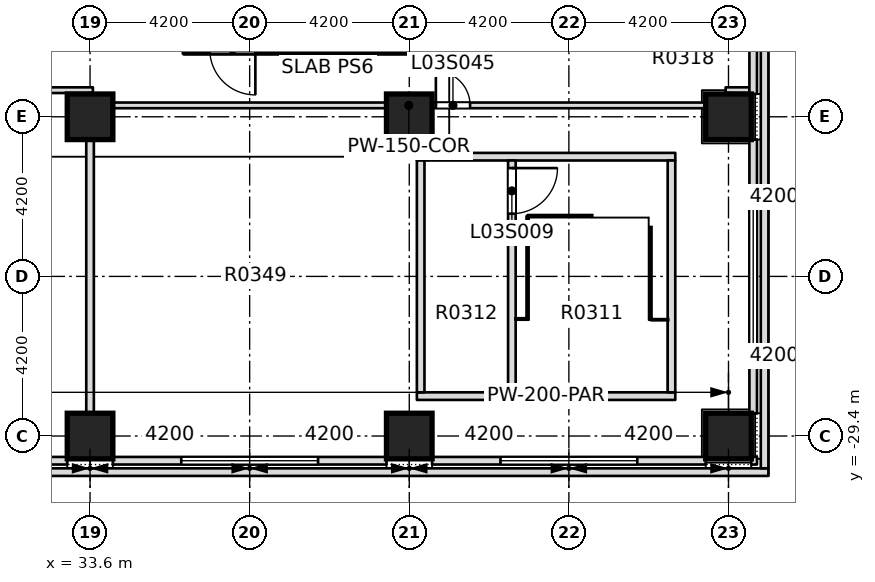
"""IFC4 building model, lengths in metres.
Left out: names, types, materials, properties, quantities, classifications, styles, units other than length and angle.
Written with IfcOpenShell. Run it as: python <this file> out.ifc"""

import sys

from ifc_helpers import new_model, si_unit, direction, frame, frame_2d, origin, origin_2d, place, context, subcontext, project, spatial, rectangle, extrude, element, fill, save


model = new_model("IFC4")
c1 = context("Model", 3, precision=1e-05, world=origin(), true_north=direction((0.0, 1.0)))
c2 = subcontext(c1, "Body", "Model", "MODEL_VIEW")
j1 = project(units=[si_unit("LENGTHUNIT", "METRE"), si_unit("PLANEANGLEUNIT", "RADIAN")], contexts=[c1])
p1 = place(None, origin())
s1 = spatial("IfcSite", under=j1, at=p1, CompositionType="ELEMENT")
p2 = place(p1, origin())
s2 = spatial("IfcBuilding", under=s1, at=p2, CompositionType="ELEMENT")
p3 = place(p2, frame((0.0, 0.0, 20.0)))
s3 = spatial("IfcBuildingStorey", under=s2, at=p3, CompositionType="ELEMENT", Elevation=20.0)
for number, where, z_axis, x_axis in (
    (1, (33.6, -29.4, -0.4), (0.0, 0.0, 1.0), (1.0, 0.0, 0.0)),
    (2, (42.0, -29.4, -0.4), (0.0, 0.0, 1.0), (1.0, 0.0, 0.0)),
):
    element("IfcColumn", number, at=place(p3, frame(where, z_axis=z_axis, x_axis=x_axis)), inside=s3, PredefinedType="COLUMN", context=c2, shape_type="SweptSolid", body=[
        extrude(rectangle(XDim=1.2, YDim=1.2, at=origin_2d()), origin(), (0.0, 0.0, 1.0), 5.0),
    ])
p4 = place(p3, frame((50.4, -29.4, 0.0), z_axis=(0.0, 0.0, 1.0), x_axis=(1.0, 0.0, 0.0)))
e3 = element("IfcColumn", 3, at=p4, inside=s3, PredefinedType="COLUMN", context=c2, shape_type="SweptSolid", body=[
    extrude(rectangle(XDim=1.2, YDim=1.2, at=origin_2d()), origin(), (0.0, 0.0, 1.0), 4.6),
])
for number, where, z_axis, x_axis in (
    (4, (33.6, -21.0, -0.4), (0.0, 0.0, 1.0), (1.0, 0.0, 0.0)),
    (5, (42.0, -21.0, -0.4), (0.0, 0.0, 1.0), (1.0, 0.0, 0.0)),
):
    element("IfcColumn", number, at=place(p3, frame(where, z_axis=z_axis, x_axis=x_axis)), inside=s3, PredefinedType="COLUMN", context=c2, shape_type="SweptSolid", body=[
        extrude(rectangle(XDim=1.2, YDim=1.2, at=origin_2d()), origin(), (0.0, 0.0, 1.0), 5.4),
    ])
p5 = place(p3, frame((50.4, -21.0, 0.0), z_axis=(0.0, 0.0, 1.0), x_axis=(1.0, 0.0, 0.0)))
e6 = element("IfcColumn", 6, at=p5, inside=s3, PredefinedType="COLUMN", context=c2, shape_type="SweptSolid", body=[
    extrude(rectangle(XDim=1.2, YDim=1.2, at=origin_2d()), origin(), (0.0, 0.0, 1.0), 4.6),
])
p6 = place(p3, frame((-26.25, -30.35, 5.0), z_axis=(0.0, 0.0, 1.0), x_axis=(1.0, 0.0, 0.0)))
e7 = element("IfcWall", 7, at=p6, inside=s3, PredefinedType="PARAPET", context=c2, shape_type="SweptSolid", body=[
    extrude(rectangle(XDim=77.7, YDim=0.2, at=frame_2d((38.85, 0.0))), origin(), (0.0, 0.0, 1.0), 1.2),
])
p7 = place(p3, frame((51.35, -30.25, 5.0), z_axis=(0.0, 0.0, 1.0), x_axis=(0.0, 1.0, 0.0)))
e8 = element("IfcWall", 8, at=p7, inside=s3, PredefinedType="PARAPET", context=c2, shape_type="SweptSolid", body=[
    extrude(rectangle(XDim=60.5, YDim=0.2, at=frame_2d((30.25, 0.0))), origin(), (0.0, 0.0, 1.0), 1.2),
])
for number, where, z_axis, x_axis in (
    (9, (42.2, -28.35, 0.0), (0.0, 0.0, 1.0), (1.0, 0.0, 0.0)),
    (10, (42.2, -22.05, 0.0), (0.0, 0.0, 1.0), (1.0, 0.0, 0.0)),
):
    element("IfcWall", number, at=place(p3, frame(where, z_axis=z_axis, x_axis=x_axis)), inside=s3, PredefinedType="PARTITIONING", context=c2, shape_type="SweptSolid", body=[
        extrude(rectangle(XDim=6.8, YDim=0.2, at=frame_2d((3.4, 0.0))), origin(), (0.0, 0.0, 1.0), 4.6),
    ])
p8 = place(p3, frame((33.5, -20.7, 0.0), z_axis=(0.0, 0.0, 1.0), x_axis=(1.0, 0.0, 0.0)))
e11 = element("IfcWall", 11, at=p8, inside=s3, PredefinedType="PARTITIONING", context=c2, shape_type="SweptSolid", body=[
    extrude(rectangle(XDim=16.975, YDim=0.15, at=frame_2d((8.488, 0.0))), origin(), (0.0, 0.0, 1.0), 4.6),
])
p9 = place(p8, frame((9.2, 0.0, 0.0)))
e12 = element("IfcOpeningElement", 12, at=p9, cuts=e11, PredefinedType="OPENING", context=c2, shape_type="SweptSolid", body=[
    extrude(rectangle(XDim=0.9, YDim=2.1, at=frame_2d((0.45, 1.05))), frame((0.0, 0.085, 0.0), z_axis=(0.0, -1.0, 0.0), x_axis=(1.0, 0.0, 0.0)), (0.0, 0.0, 1.0), 0.17),
])
p10 = place(p3, frame((-25.75, -20.3, 0.0), z_axis=(0.0, 0.0, 1.0), x_axis=(1.0, 0.0, 0.0)))
e13 = element("IfcWall", 13, at=p10, inside=s3, PredefinedType="PARTITIONING", context=c2, shape_type="SweptSolid", body=[
    extrude(rectangle(XDim=59.425, YDim=0.15, at=frame_2d((29.712, 0.0))), origin(), (0.0, 0.0, 1.0), 4.6),
])
p11 = place(p10, frame((4.2, 0.0, 0.0)))
e14 = element("IfcOpeningElement", 14, at=p11, cuts=e13, PredefinedType="OPENING", context=c2, shape_type="SweptSolid", body=[
    extrude(rectangle(XDim=1.1, YDim=2.1, at=frame_2d((0.55, 1.05))), frame((0.0, 0.085, 0.0), z_axis=(0.0, -1.0, 0.0), x_axis=(1.0, 0.0, 0.0)), (0.0, 0.0, 1.0), 0.17),
])
p12 = place(p10, frame((12.35, 0.0, 0.0)))
e15 = element("IfcOpeningElement", 15, at=p12, cuts=e13, PredefinedType="OPENING", context=c2, shape_type="SweptSolid", body=[
    extrude(rectangle(XDim=0.9, YDim=2.1, at=frame_2d((0.45, 1.05))), frame((0.0, 0.085, 0.0), z_axis=(0.0, -1.0, 0.0), x_axis=(1.0, 0.0, 0.0)), (0.0, 0.0, 1.0), 0.17),
])
p13 = place(p10, frame((21.1, 0.0, 0.0)))
e16 = element("IfcOpeningElement", 16, at=p13, cuts=e13, PredefinedType="OPENING", context=c2, shape_type="SweptSolid", body=[
    extrude(rectangle(XDim=0.9, YDim=2.1, at=frame_2d((0.45, 1.05))), frame((0.0, 0.085, 0.0), z_axis=(0.0, -1.0, 0.0), x_axis=(1.0, 0.0, 0.0)), (0.0, 0.0, 1.0), 0.17),
])
p14 = place(p10, frame((32.2, 0.0, 0.0)))
e17 = element("IfcOpeningElement", 17, at=p14, cuts=e13, PredefinedType="OPENING", context=c2, shape_type="SweptSolid", body=[
    extrude(rectangle(XDim=1.2, YDim=2.1, at=frame_2d((0.6, 1.05))), frame((0.0, 0.085, 0.0), z_axis=(0.0, -1.0, 0.0), x_axis=(1.0, 0.0, 0.0)), (0.0, 0.0, 1.0), 0.17),
])
p15 = place(p10, frame((46.2, 0.0, 0.0)))
e18 = element("IfcOpeningElement", 18, at=p15, cuts=e13, PredefinedType="OPENING", context=c2, shape_type="SweptSolid", body=[
    extrude(rectangle(XDim=1.1, YDim=2.1, at=frame_2d((0.55, 1.05))), frame((0.0, 0.085, 0.0), z_axis=(0.0, -1.0, 0.0), x_axis=(1.0, 0.0, 0.0)), (0.0, 0.0, 1.0), 0.17),
])
p16 = place(p10, frame((54.7, 0.0, 0.0)))
e19 = element("IfcOpeningElement", 19, at=p16, cuts=e13, PredefinedType="OPENING", context=c2, shape_type="SweptSolid", body=[
    extrude(rectangle(XDim=0.9, YDim=2.1, at=frame_2d((0.45, 1.05))), frame((0.0, 0.085, 0.0), z_axis=(0.0, -1.0, 0.0), x_axis=(1.0, 0.0, 0.0)), (0.0, 0.0, 1.0), 0.17),
])
p17 = place(p3, frame((50.325, -20.3, 0.0), z_axis=(0.0, 0.0, 1.0), x_axis=(1.0, 0.0, 0.0)))
e20 = element("IfcWall", 20, at=p17, inside=s3, PredefinedType="PARTITIONING", context=c2, shape_type="SweptSolid", body=[
    extrude(rectangle(XDim=0.625, YDim=0.15, at=frame_2d((0.312, 0.0))), origin(), (0.0, 0.0, 1.0), 4.6),
])
p18 = place(p3, frame((36.075, -19.225, 0.0), z_axis=(0.0, 0.0, 1.0), x_axis=(1.0, 0.0, 0.0)))
e21 = element("IfcWall", 21, at=p18, inside=s3, PredefinedType="SOLIDWALL", context=c2, shape_type="SweptSolid", body=[
    extrude(rectangle(XDim=6.75, YDim=0.2, at=frame_2d((3.375, 0.0))), origin(), (0.0, 0.0, 1.0), 4.6),
])
p19 = place(p18, frame((0.675, 0.0, 0.0)))
e22 = element("IfcOpeningElement", 22, at=p19, cuts=e21, PredefinedType="OPENING", context=c2, shape_type="SweptSolid", body=[
    extrude(rectangle(XDim=1.2, YDim=2.1, at=frame_2d((0.6, 1.05))), frame((0.0, 0.11, 0.0), z_axis=(0.0, -1.0, 0.0), x_axis=(1.0, 0.0, 0.0)), (0.0, 0.0, 1.0), 0.22),
])
p20 = place(p3, frame((33.6, -29.95, 0.0), z_axis=(0.0, 0.0, 1.0), x_axis=(0.0, 1.0, 0.0)))
e23 = element("IfcWall", 23, at=p20, inside=s3, PredefinedType="PARTITIONING", context=c2, shape_type="SweptSolid", body=[
    extrude(rectangle(XDim=9.175, YDim=0.2, at=frame_2d((4.587, 0.0))), origin(), (0.0, 0.0, 1.0), 4.6),
])
p21 = place(p3, frame((33.6, -20.625, 0.0), z_axis=(0.0, 0.0, 1.0), x_axis=(0.0, 1.0, 0.0)))
e24 = element("IfcWall", 24, at=p21, inside=s3, PredefinedType="PARTITIONING", context=c2, shape_type="SweptSolid", body=[
    extrude(rectangle(XDim=0.25, YDim=0.15, at=frame_2d((0.125, 0.0))), origin(), (0.0, 0.0, 1.0), 4.6),
])
p22 = place(p3, frame((42.3, -28.25, 0.0), z_axis=(0.0, 0.0, 1.0), x_axis=(0.0, 1.0, 0.0)))
e25 = element("IfcWall", 25, at=p22, inside=s3, PredefinedType="PARTITIONING", context=c2, shape_type="SweptSolid", body=[
    extrude(rectangle(XDim=6.1, YDim=0.2, at=frame_2d((3.05, 0.0))), origin(), (0.0, 0.0, 1.0), 4.6),
])
p23 = place(p3, frame((44.7, -28.25, 0.0), z_axis=(0.0, 0.0, 1.0), x_axis=(0.0, 1.0, 0.0)))
e26 = element("IfcWall", 26, at=p23, inside=s3, PredefinedType="PARTITIONING", context=c2, shape_type="SweptSolid", body=[
    extrude(rectangle(XDim=6.1, YDim=0.2, at=frame_2d((3.05, 0.0))), origin(), (0.0, 0.0, 1.0), 4.6),
])
p24 = place(p23, frame((4.7, 0.0, 0.0)))
e27 = element("IfcOpeningElement", 27, at=p24, cuts=e26, PredefinedType="OPENING", context=c2, shape_type="SweptSolid", body=[
    extrude(rectangle(XDim=1.2, YDim=2.1, at=frame_2d((0.6, 1.05))), frame((0.0, 0.11, 0.0), z_axis=(0.0, -1.0, 0.0), x_axis=(1.0, 0.0, 0.0)), (0.0, 0.0, 1.0), 0.22),
])
p25 = place(p3, frame((48.9, -28.25, 0.0), z_axis=(0.0, 0.0, 1.0), x_axis=(0.0, 1.0, 0.0)))
e28 = element("IfcWall", 28, at=p25, inside=s3, PredefinedType="PARTITIONING", context=c2, shape_type="SweptSolid", body=[
    extrude(rectangle(XDim=6.1, YDim=0.2, at=frame_2d((3.05, 0.0))), origin(), (0.0, 0.0, 1.0), 4.6),
])
p26 = place(p3, frame((50.4, -20.625, 0.0), z_axis=(0.0, 0.0, 1.0), x_axis=(0.0, 1.0, 0.0)))
e29 = element("IfcWall", 29, at=p26, inside=s3, PredefinedType="PARTITIONING", context=c2, shape_type="SweptSolid", body=[
    extrude(rectangle(XDim=0.25, YDim=0.15, at=frame_2d((0.125, 0.0))), origin(), (0.0, 0.0, 1.0), 4.6),
])
p27 = place(p3, frame((25.8, -30.05, 0.0), z_axis=(0.0, 0.0, 1.0), x_axis=(1.0, 0.0, 0.0)))
e30 = element("IfcWall", 30, at=p27, inside=s3, PredefinedType="STANDARD", context=c2, shape_type="SweptSolid", body=[
    extrude(rectangle(XDim=7.2, YDim=0.2, at=frame_2d((3.6, 0.0))), origin(), (0.0, 0.0, 1.0), 4.6),
])
p28 = place(p27, frame((1.8, 0.0, 0.9)))
e31 = element("IfcOpeningElement", 31, at=p28, cuts=e30, PredefinedType="OPENING", context=c2, shape_type="SweptSolid", body=[
    extrude(rectangle(XDim=3.6, YDim=2.8, at=frame_2d((1.8, 1.4))), frame((0.0, 0.11, 0.0), z_axis=(0.0, -1.0, 0.0), x_axis=(1.0, 0.0, 0.0)), (0.0, 0.0, 1.0), 0.22),
])
p29 = place(p3, frame((34.2, -30.05, 0.0), z_axis=(0.0, 0.0, 1.0), x_axis=(1.0, 0.0, 0.0)))
e32 = element("IfcWall", 32, at=p29, inside=s3, PredefinedType="STANDARD", context=c2, shape_type="SweptSolid", body=[
    extrude(rectangle(XDim=7.2, YDim=0.2, at=frame_2d((3.6, 0.0))), origin(), (0.0, 0.0, 1.0), 4.6),
])
p30 = place(p29, frame((1.8, 0.0, 0.9)))
e33 = element("IfcOpeningElement", 33, at=p30, cuts=e32, PredefinedType="OPENING", context=c2, shape_type="SweptSolid", body=[
    extrude(rectangle(XDim=3.6, YDim=2.8, at=frame_2d((1.8, 1.4))), frame((0.0, 0.11, 0.0), z_axis=(0.0, -1.0, 0.0), x_axis=(1.0, 0.0, 0.0)), (0.0, 0.0, 1.0), 0.22),
])
p31 = place(p3, frame((42.6, -30.05, 0.0), z_axis=(0.0, 0.0, 1.0), x_axis=(1.0, 0.0, 0.0)))
e34 = element("IfcWall", 34, at=p31, inside=s3, PredefinedType="STANDARD", context=c2, shape_type="SweptSolid", body=[
    extrude(rectangle(XDim=7.2, YDim=0.2, at=frame_2d((3.6, 0.0))), origin(), (0.0, 0.0, 1.0), 4.6),
])
p32 = place(p31, frame((1.8, 0.0, 0.9)))
e35 = element("IfcOpeningElement", 35, at=p32, cuts=e34, PredefinedType="OPENING", context=c2, shape_type="SweptSolid", body=[
    extrude(rectangle(XDim=3.6, YDim=2.8, at=frame_2d((1.8, 1.4))), frame((0.0, 0.11, 0.0), z_axis=(0.0, -1.0, 0.0), x_axis=(1.0, 0.0, 0.0)), (0.0, 0.0, 1.0), 0.22),
])
p33 = place(p3, frame((51.0, -30.05, 0.0), z_axis=(0.0, 0.0, 1.0), x_axis=(1.0, 0.0, 0.0)))
e36 = element("IfcWall", 36, at=p33, inside=s3, PredefinedType="STANDARD", context=c2, shape_type="SweptSolid", body=[
    extrude(rectangle(XDim=0.15, YDim=0.2, at=frame_2d((0.075, 0.0))), origin(), (0.0, 0.0, 1.0), 4.6),
])
p34 = place(p3, frame((51.05, -28.8, 0.0), z_axis=(0.0, 0.0, 1.0), x_axis=(0.0, 1.0, 0.0)))
e37 = element("IfcWall", 37, at=p34, inside=s3, PredefinedType="STANDARD", context=c2, shape_type="SweptSolid", body=[
    extrude(rectangle(XDim=7.2, YDim=0.2, at=frame_2d((3.6, 0.0))), origin(), (0.0, 0.0, 1.0), 4.6),
])
p35 = place(p34, frame((1.8, 0.0, 0.9)))
e38 = element("IfcOpeningElement", 38, at=p35, cuts=e37, PredefinedType="OPENING", context=c2, shape_type="SweptSolid", body=[
    extrude(rectangle(XDim=3.6, YDim=2.8, at=frame_2d((1.8, 1.4))), frame((0.0, 0.11, 0.0), z_axis=(0.0, -1.0, 0.0), x_axis=(1.0, 0.0, 0.0)), (0.0, 0.0, 1.0), 0.22),
])
p36 = place(p3, frame((51.05, -20.4, 0.0), z_axis=(0.0, 0.0, 1.0), x_axis=(0.0, 1.0, 0.0)))
e39 = element("IfcWall", 39, at=p36, inside=s3, PredefinedType="STANDARD", context=c2, shape_type="SweptSolid", body=[
    extrude(rectangle(XDim=7.2, YDim=0.2, at=frame_2d((3.6, 0.0))), origin(), (0.0, 0.0, 1.0), 4.6),
])
p37 = place(p36, frame((2.42, 0.0, 0.9)))
e40 = element("IfcOpeningElement", 40, at=p37, cuts=e39, PredefinedType="OPENING", context=c2, shape_type="SweptSolid", body=[
    extrude(rectangle(XDim=3.6, YDim=2.8, at=frame_2d((1.8, 1.4))), frame((0.0, 0.11, 0.0), z_axis=(0.0, -1.0, 0.0), x_axis=(1.0, 0.0, 0.0)), (0.0, 0.0, 1.0), 0.22),
])
p38 = place(p24, origin())
e41 = element("IfcDoor", 41, at=p38, inside=s3, OperationType="DOUBLE_DOOR_SINGLE_SWING", PredefinedType="DOOR", context=c2, shape_type="SweptSolid", body=[
    extrude(rectangle(XDim=1.2, YDim=2.1, at=frame_2d((0.6, 1.05))), frame((0.0, 0.025, 0.0), z_axis=(0.0, -1.0, 0.0), x_axis=(1.0, 0.0, 0.0)), (0.0, 0.0, 1.0), 0.05),
])
fill(e27, e41)
p39 = place(p9, origin())
e42 = element("IfcDoor", 42, at=p39, inside=s3, OperationType="SINGLE_SWING_RIGHT", PredefinedType="DOOR", context=c2, shape_type="SweptSolid", body=[
    extrude(rectangle(XDim=0.9, YDim=2.1, at=frame_2d((0.45, 1.05))), frame((0.0, 0.025, 0.0), z_axis=(0.0, -1.0, 0.0), x_axis=(1.0, 0.0, 0.0)), (0.0, 0.0, 1.0), 0.05),
])
fill(e12, e42)
p40 = place(p30, origin())
e43 = element("IfcWindow", 43, at=p40, inside=s3, PartitioningType="SINGLE_PANEL", PredefinedType="WINDOW", context=c2, shape_type="SweptSolid", body=[
    extrude(rectangle(XDim=3.6, YDim=2.8, at=frame_2d((1.8, 1.4))), frame((0.0, 0.03, 0.0), z_axis=(0.0, -1.0, 0.0), x_axis=(1.0, 0.0, 0.0)), (0.0, 0.0, 1.0), 0.06),
])
fill(e33, e43)
p41 = place(p32, origin())
e44 = element("IfcWindow", 44, at=p41, inside=s3, PartitioningType="SINGLE_PANEL", PredefinedType="WINDOW", context=c2, shape_type="SweptSolid", body=[
    extrude(rectangle(XDim=3.6, YDim=2.8, at=frame_2d((1.8, 1.4))), frame((0.0, 0.03, 0.0), z_axis=(0.0, -1.0, 0.0), x_axis=(1.0, 0.0, 0.0)), (0.0, 0.0, 1.0), 0.06),
])
fill(e35, e44)
p42 = place(p35, origin())
e45 = element("IfcWindow", 45, at=p42, inside=s3, PartitioningType="SINGLE_PANEL", PredefinedType="WINDOW", context=c2, shape_type="SweptSolid", body=[
    extrude(rectangle(XDim=3.6, YDim=2.8, at=frame_2d((1.8, 1.4))), frame((0.0, 0.03, 0.0), z_axis=(0.0, -1.0, 0.0), x_axis=(1.0, 0.0, 0.0)), (0.0, 0.0, 1.0), 0.06),
])
fill(e38, e45)
save(model, sys.argv[1])
